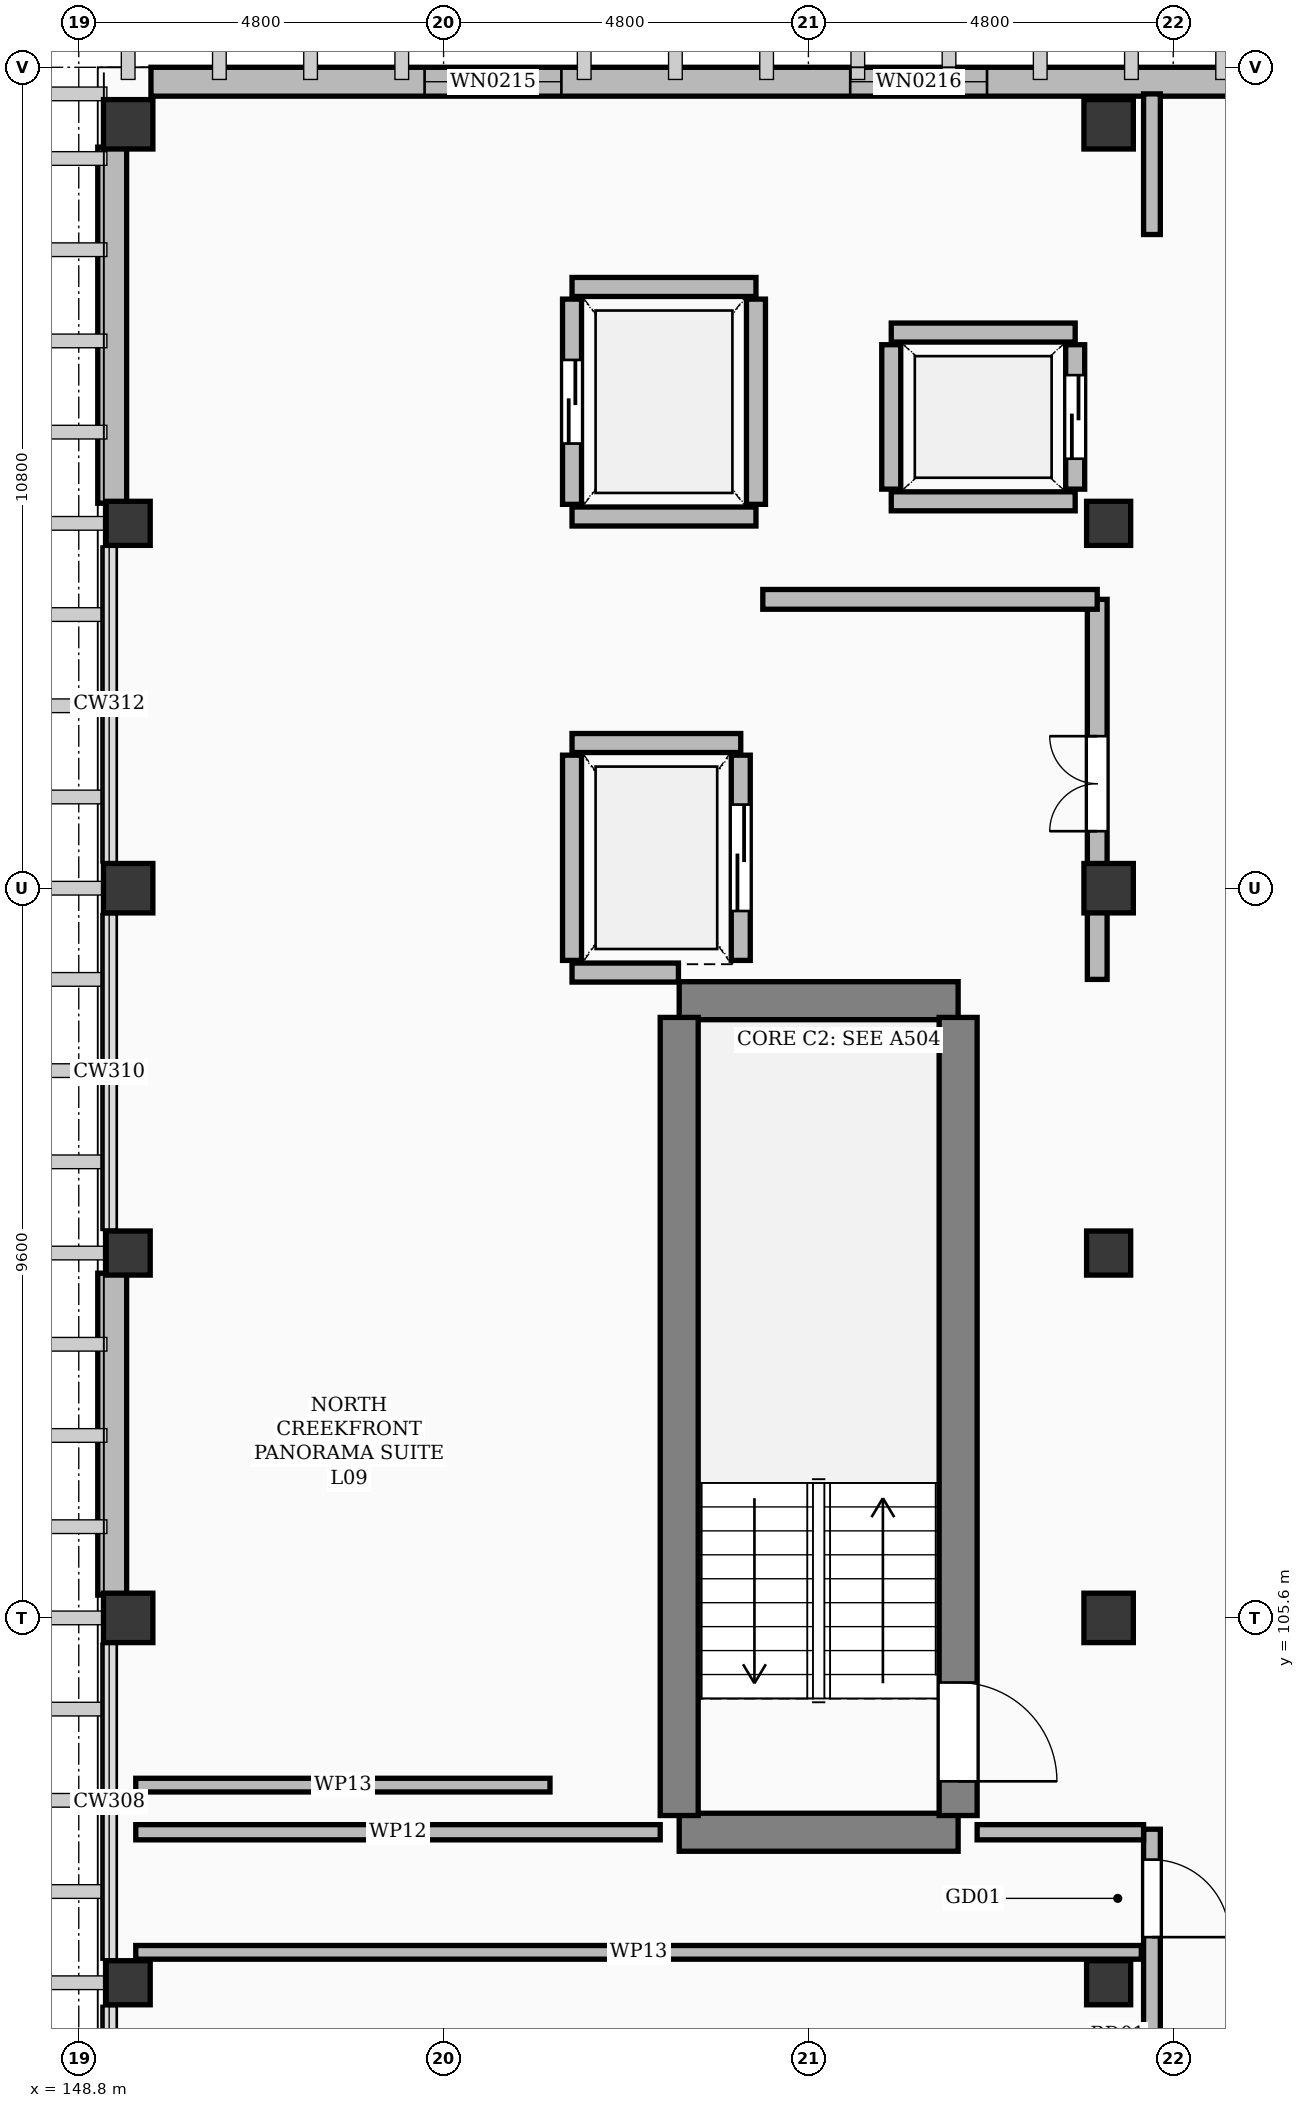
"""IFC4 building model, lengths in metres.
Left out: names, types, materials, properties, quantities, classifications, styles, units other than length and angle.
Written with IfcOpenShell. Run it as: python <this file> out.ifc"""

import sys

from ifc_helpers import new_model, si_unit, direction, frame, frame_2d, origin, origin_2d, place, context, subcontext, project, spatial, rectangle, extrude, element, fill, save


model = new_model("IFC4")
c1 = context("Model", 3, precision=1e-05, world=origin(), true_north=direction((0.0, 1.0)))
c2 = subcontext(c1, "Body", "Model", "MODEL_VIEW")
j1 = project(units=[si_unit("LENGTHUNIT", "METRE"), si_unit("PLANEANGLEUNIT", "RADIAN")], contexts=[c1])
p1 = place(None, origin())
s1 = spatial("IfcSite", under=j1, at=p1, CompositionType="ELEMENT")
p2 = place(p1, origin())
s2 = spatial("IfcBuilding", under=s1, at=p2, CompositionType="ELEMENT")
p3 = place(p2, frame((0.0, 0.0, 39.0)))
s3 = spatial("IfcBuildingStorey", under=s2, at=p3, CompositionType="ELEMENT", Elevation=39.0)
for number, where, z_axis, x_axis in (
    (1, (149.45, 105.6, 0.0), (0.0, 0.0, 1.0), (1.0, 0.0, 0.0)),
    (2, (149.45, 115.2, 0.0), (0.0, 0.0, 1.0), (1.0, 0.0, 0.0)),
    (3, (149.45, 125.25, 0.0), (0.0, 0.0, 1.0), (1.0, 0.0, 0.0)),
    (4, (162.35, 105.6, 0.0), (0.0, 0.0, 1.0), (1.0, 0.0, 0.0)),
    (5, (162.35, 115.2, 0.0), (0.0, 0.0, 1.0), (1.0, 0.0, 0.0)),
    (6, (162.35, 125.25, 0.0), (0.0, 0.0, 1.0), (1.0, 0.0, 0.0)),
):
    element("IfcColumn", number, at=place(p3, frame(where, z_axis=z_axis, x_axis=x_axis)), inside=s3, PredefinedType="COLUMN", context=c2, shape_type="SweptSolid", body=[
        extrude(rectangle(XDim=0.65, YDim=0.65, at=origin_2d()), origin(), (0.0, 0.0, 1.0), 3.6),
    ])
for number, where, z_axis, x_axis in (
    (7, (149.45, 100.8, 0.0), (0.0, 0.0, 1.0), (1.0, 0.0, 0.0)),
    (8, (149.45, 110.4, 0.0), (0.0, 0.0, 1.0), (1.0, 0.0, 0.0)),
    (9, (149.45, 120.0, 0.0), (0.0, 0.0, 1.0), (1.0, 0.0, 0.0)),
    (10, (162.35, 100.8, 0.0), (0.0, 0.0, 1.0), (1.0, 0.0, 0.0)),
    (11, (162.35, 110.4, 0.0), (0.0, 0.0, 1.0), (1.0, 0.0, 0.0)),
    (12, (162.35, 120.0, 0.0), (0.0, 0.0, 1.0), (1.0, 0.0, 0.0)),
):
    element("IfcColumn", number, at=place(p3, frame(where, z_axis=z_axis, x_axis=x_axis)), inside=s3, PredefinedType="COLUMN", context=c2, shape_type="SweptSolid", body=[
        extrude(rectangle(XDim=0.58, YDim=0.58, at=origin_2d()), origin(), (0.0, 0.0, 1.0), 3.6),
    ])
p4 = place(p3, frame((149.75, 125.81, 0.0), z_axis=(0.0, 0.0, 1.0), x_axis=(1.0, 0.0, 0.0)))
e13 = element("IfcWall", 13, at=p4, inside=s3, PredefinedType="SOLIDWALL", context=c2, shape_type="SweptSolid", body=[
    extrude(rectangle(XDim=29.3, YDim=0.38, at=frame_2d((14.65, 0.0))), origin(), (0.0, 0.0, 1.0), 3.36),
])
p5 = place(p4, frame((3.6, 0.0, 0.55)))
e14 = element("IfcOpeningElement", 14, at=p5, cuts=e13, PredefinedType="OPENING", context=c2, shape_type="SweptSolid", body=[
    extrude(rectangle(XDim=1.8, YDim=1.76, at=frame_2d((0.9, 0.88))), frame((0.0, 0.202, 0.0), z_axis=(0.0, -1.0, 0.0), x_axis=(1.0, 0.0, 0.0)), (0.0, 0.0, 1.0), 0.404),
])
p6 = place(p4, frame((9.2, 0.0, 0.55)))
e15 = element("IfcOpeningElement", 15, at=p6, cuts=e13, PredefinedType="OPENING", context=c2, shape_type="SweptSolid", body=[
    extrude(rectangle(XDim=1.8, YDim=1.76, at=frame_2d((0.9, 0.88))), frame((0.0, 0.202, 0.0), z_axis=(0.0, -1.0, 0.0), x_axis=(1.0, 0.0, 0.0)), (0.0, 0.0, 1.0), 0.404),
])
p7 = place(p4, frame((19.6, 0.0, 0.55)))
e16 = element("IfcOpeningElement", 16, at=p7, cuts=e13, PredefinedType="OPENING", context=c2, shape_type="SweptSolid", body=[
    extrude(rectangle(XDim=1.8, YDim=1.76, at=frame_2d((0.9, 0.88))), frame((0.0, 0.202, 0.0), z_axis=(0.0, -1.0, 0.0), x_axis=(1.0, 0.0, 0.0)), (0.0, 0.0, 1.0), 0.404),
])
p8 = place(p4, frame((25.2, 0.0, 0.55)))
e17 = element("IfcOpeningElement", 17, at=p8, cuts=e13, PredefinedType="OPENING", context=c2, shape_type="SweptSolid", body=[
    extrude(rectangle(XDim=1.8, YDim=1.76, at=frame_2d((0.9, 0.88))), frame((0.0, 0.202, 0.0), z_axis=(0.0, -1.0, 0.0), x_axis=(1.0, 0.0, 0.0)), (0.0, 0.0, 1.0), 0.404),
])
p9 = place(p3, frame((149.24, 105.9, 0.0), z_axis=(0.0, 0.0, 1.0), x_axis=(0.0, 1.0, 0.0)))
e18 = element("IfcWall", 18, at=p9, inside=s3, PredefinedType="SOLIDWALL", context=c2, shape_type="SweptSolid", body=[
    extrude(rectangle(XDim=4.235, YDim=0.38, at=frame_2d((2.118, 0.0))), origin(), (0.0, 0.0, 1.0), 2.772),
])
p10 = place(p3, frame((149.24, 120.265, 0.0), z_axis=(0.0, 0.0, 1.0), x_axis=(0.0, 1.0, 0.0)))
e19 = element("IfcWall", 19, at=p10, inside=s3, PredefinedType="SOLIDWALL", context=c2, shape_type="SweptSolid", body=[
    extrude(rectangle(XDim=4.685, YDim=0.38, at=frame_2d((2.343, 0.0))), origin(), (0.0, 0.0, 1.0), 2.602),
])
for number, where, z_axis, x_axis in (
    (20, (156.7, 102.78, 0.0), (0.0, 0.0, 1.0), (1.0, 0.0, 0.0)),
    (21, (156.7, 113.72, 0.0), (0.0, 0.0, 1.0), (1.0, 0.0, 0.0)),
):
    element("IfcWall", number, at=place(p3, frame(where, z_axis=z_axis, x_axis=x_axis)), inside=s3, PredefinedType="SHEAR", context=c2, shape_type="SweptSolid", body=[
        extrude(rectangle(XDim=3.67, YDim=0.5, at=frame_2d((1.835, 0.0))), origin(), (0.0, 0.0, 1.0), 3.36),
    ])
p11 = place(p3, frame((156.7, 103.0, 0.0), z_axis=(0.0, 0.0, 1.0), x_axis=(0.0, 1.0, 0.0)))
e22 = element("IfcWall", 22, at=p11, inside=s3, PredefinedType="SHEAR", context=c2, shape_type="SweptSolid", body=[
    extrude(rectangle(XDim=10.5, YDim=0.5, at=frame_2d((5.25, 0.0))), origin(), (0.0, 0.0, 1.0), 3.36),
])
p12 = place(p3, frame((160.37, 103.0, 0.0), z_axis=(0.0, 0.0, 1.0), x_axis=(0.0, 1.0, 0.0)))
e23 = element("IfcWall", 23, at=p12, inside=s3, PredefinedType="SHEAR", context=c2, shape_type="SweptSolid", body=[
    extrude(rectangle(XDim=10.5, YDim=0.5, at=frame_2d((5.25, 0.0))), origin(), (0.0, 0.0, 1.0), 3.36),
])
p13 = place(p12, frame((0.45, 0.0, 0.0)))
e24 = element("IfcOpeningElement", 24, at=p13, cuts=e23, PredefinedType="OPENING", context=c2, shape_type="SweptSolid", body=[
    extrude(rectangle(XDim=1.3, YDim=2.15, at=frame_2d((0.65, 1.075))), frame((0.0, 0.262, 0.0), z_axis=(0.0, -1.0, 0.0), x_axis=(1.0, 0.0, 0.0)), (0.0, 0.0, 1.0), 0.524),
])
p14 = place(p3, frame((155.29, 114.09, 0.0), z_axis=(0.0, 0.0, 1.0), x_axis=(1.0, 0.0, 0.0)))
e25 = element("IfcWall", 25, at=p14, inside=s3, PredefinedType="SOLIDWALL", context=c2, shape_type="SweptSolid", body=[
    extrude(rectangle(XDim=1.4, YDim=0.25, at=frame_2d((0.7, 0.0))), origin(), (0.0, 0.0, 1.0), 3.36),
])
p15 = place(p3, frame((155.29, 117.11, 0.0), z_axis=(0.0, 0.0, 1.0), x_axis=(1.0, 0.0, 0.0)))
e26 = element("IfcWall", 26, at=p15, inside=s3, PredefinedType="SOLIDWALL", context=c2, shape_type="SweptSolid", body=[
    extrude(rectangle(XDim=2.22, YDim=0.25, at=frame_2d((1.11, 0.0))), origin(), (0.0, 0.0, 1.0), 3.36),
])
p16 = place(p3, frame((155.29, 114.25, 0.0), z_axis=(0.0, 0.0, 1.0), x_axis=(0.0, 1.0, 0.0)))
e27 = element("IfcWall", 27, at=p16, inside=s3, PredefinedType="SOLIDWALL", context=c2, shape_type="SweptSolid", body=[
    extrude(rectangle(XDim=2.7, YDim=0.25, at=frame_2d((1.35, 0.0))), origin(), (0.0, 0.0, 1.0), 2.772),
])
p17 = place(p3, frame((157.51, 114.25, 0.0), z_axis=(0.0, 0.0, 1.0), x_axis=(0.0, 1.0, 0.0)))
e28 = element("IfcWall", 28, at=p17, inside=s3, PredefinedType="SOLIDWALL", context=c2, shape_type="SweptSolid", body=[
    extrude(rectangle(XDim=2.7, YDim=0.25, at=frame_2d((1.35, 0.0))), origin(), (0.0, 0.0, 1.0), 2.772),
])
p18 = place(p17, frame((0.65, 0.0, 0.0)))
e29 = element("IfcOpeningElement", 29, at=p18, cuts=e28, PredefinedType="OPENING", context=c2, shape_type="SweptSolid", body=[
    extrude(rectangle(XDim=1.4, YDim=2.3, at=frame_2d((0.7, 1.15))), frame((0.0, 0.137, 0.0), z_axis=(0.0, -1.0, 0.0), x_axis=(1.0, 0.0, 0.0)), (0.0, 0.0, 1.0), 0.274),
])
p19 = place(p3, frame((159.49, 120.29, 0.0), z_axis=(0.0, 0.0, 1.0), x_axis=(1.0, 0.0, 0.0)))
e30 = element("IfcWall", 30, at=p19, inside=s3, PredefinedType="SOLIDWALL", context=c2, shape_type="SweptSolid", body=[
    extrude(rectangle(XDim=2.42, YDim=0.25, at=frame_2d((1.21, 0.0))), origin(), (0.0, 0.0, 1.0), 2.772),
])
p20 = place(p3, frame((159.49, 122.51, 0.0), z_axis=(0.0, 0.0, 1.0), x_axis=(1.0, 0.0, 0.0)))
e31 = element("IfcWall", 31, at=p20, inside=s3, PredefinedType="SOLIDWALL", context=c2, shape_type="SweptSolid", body=[
    extrude(rectangle(XDim=2.42, YDim=0.25, at=frame_2d((1.21, 0.0))), origin(), (0.0, 0.0, 1.0), 3.36),
])
p21 = place(p3, frame((159.49, 120.45, 0.0), z_axis=(0.0, 0.0, 1.0), x_axis=(0.0, 1.0, 0.0)))
e32 = element("IfcWall", 32, at=p21, inside=s3, PredefinedType="SOLIDWALL", context=c2, shape_type="SweptSolid", body=[
    extrude(rectangle(XDim=1.9, YDim=0.25, at=frame_2d((0.95, 0.0))), origin(), (0.0, 0.0, 1.0), 3.36),
])
p22 = place(p3, frame((161.91, 120.45, 0.0), z_axis=(0.0, 0.0, 1.0), x_axis=(0.0, 1.0, 0.0)))
e33 = element("IfcWall", 33, at=p22, inside=s3, PredefinedType="SOLIDWALL", context=c2, shape_type="SweptSolid", body=[
    extrude(rectangle(XDim=1.9, YDim=0.25, at=frame_2d((0.95, 0.0))), origin(), (0.0, 0.0, 1.0), 3.36),
])
p23 = place(p22, frame((0.4, 0.0, 0.0)))
e34 = element("IfcOpeningElement", 34, at=p23, cuts=e33, PredefinedType="OPENING", context=c2, shape_type="SweptSolid", body=[
    extrude(rectangle(XDim=1.1, YDim=2.2, at=frame_2d((0.55, 1.1))), frame((0.0, 0.137, 0.0), z_axis=(0.0, -1.0, 0.0), x_axis=(1.0, 0.0, 0.0)), (0.0, 0.0, 1.0), 0.274),
])
p24 = place(p3, frame((155.29, 120.09, 0.0), z_axis=(0.0, 0.0, 1.0), x_axis=(1.0, 0.0, 0.0)))
e35 = element("IfcWall", 35, at=p24, inside=s3, PredefinedType="SOLIDWALL", context=c2, shape_type="SweptSolid", body=[
    extrude(rectangle(XDim=2.42, YDim=0.25, at=frame_2d((1.21, 0.0))), origin(), (0.0, 0.0, 1.0), 2.772),
])
p25 = place(p3, frame((155.29, 123.11, 0.0), z_axis=(0.0, 0.0, 1.0), x_axis=(1.0, 0.0, 0.0)))
e36 = element("IfcWall", 36, at=p25, inside=s3, PredefinedType="SOLIDWALL", context=c2, shape_type="SweptSolid", body=[
    extrude(rectangle(XDim=2.42, YDim=0.25, at=frame_2d((1.21, 0.0))), origin(), (0.0, 0.0, 1.0), 3.36),
])
p26 = place(p3, frame((155.29, 120.25, 0.0), z_axis=(0.0, 0.0, 1.0), x_axis=(0.0, 1.0, 0.0)))
e37 = element("IfcWall", 37, at=p26, inside=s3, PredefinedType="SOLIDWALL", context=c2, shape_type="SweptSolid", body=[
    extrude(rectangle(XDim=2.7, YDim=0.25, at=frame_2d((1.35, 0.0))), origin(), (0.0, 0.0, 1.0), 2.772),
])
p27 = place(p26, frame((0.8, 0.0, 0.0)))
e38 = element("IfcOpeningElement", 38, at=p27, cuts=e37, PredefinedType="OPENING", context=c2, shape_type="SweptSolid", body=[
    extrude(rectangle(XDim=1.1, YDim=2.2, at=frame_2d((0.55, 1.1))), frame((0.0, 0.137, 0.0), z_axis=(0.0, -1.0, 0.0), x_axis=(1.0, 0.0, 0.0)), (0.0, 0.0, 1.0), 0.274),
])
p28 = place(p3, frame((157.71, 120.25, 0.0), z_axis=(0.0, 0.0, 1.0), x_axis=(0.0, 1.0, 0.0)))
e39 = element("IfcWall", 39, at=p28, inside=s3, PredefinedType="SOLIDWALL", context=c2, shape_type="SweptSolid", body=[
    extrude(rectangle(XDim=2.7, YDim=0.25, at=frame_2d((1.35, 0.0))), origin(), (0.0, 0.0, 1.0), 2.772),
])
p29 = place(p3, frame((162.2, 114.0, 0.0), z_axis=(0.0, 0.0, 1.0), x_axis=(0.0, 1.0, 0.0)))
e40 = element("IfcWall", 40, at=p29, inside=s3, PredefinedType="SOLIDWALL", context=c2, shape_type="SweptSolid", body=[
    extrude(rectangle(XDim=5.0, YDim=0.26, at=frame_2d((2.5, 0.0))), origin(), (0.0, 0.0, 1.0), 2.772),
])
p30 = place(p29, frame((1.95, 0.0, 0.0)))
e41 = element("IfcOpeningElement", 41, at=p30, cuts=e40, PredefinedType="OPENING", context=c2, shape_type="SweptSolid", body=[
    extrude(rectangle(XDim=1.25, YDim=2.15, at=frame_2d((0.625, 1.075))), frame((0.0, 0.142, 0.0), z_axis=(0.0, -1.0, 0.0), x_axis=(1.0, 0.0, 0.0)), (0.0, 0.0, 1.0), 0.284),
])
p31 = place(p3, frame((157.8, 119.0, 0.0), z_axis=(0.0, 0.0, 1.0), x_axis=(1.0, 0.0, 0.0)))
e42 = element("IfcWall", 42, at=p31, inside=s3, PredefinedType="SOLIDWALL", context=c2, shape_type="SweptSolid", body=[
    extrude(rectangle(XDim=4.4, YDim=0.26, at=frame_2d((2.2, 0.0))), origin(), (0.0, 0.0, 1.0), 2.772),
])
p32 = place(p3, frame((162.92, 95.6, 0.0), z_axis=(0.0, 0.0, 1.0), x_axis=(0.0, 1.0, 0.0)))
e43 = element("IfcWall", 43, at=p32, inside=s3, PredefinedType="PARTITIONING", context=c2, shape_type="SweptSolid", body=[
    extrude(rectangle(XDim=7.22, YDim=0.22, at=frame_2d((3.61, 0.0))), origin(), (0.0, 0.0, 1.0), 2.772),
])
p33 = place(p32, frame((2.05, 0.0, 0.0)))
e44 = element("IfcOpeningElement", 44, at=p33, cuts=e43, PredefinedType="OPENING", context=c2, shape_type="SweptSolid", body=[
    extrude(rectangle(XDim=1.12, YDim=2.15, at=frame_2d((0.56, 1.075))), frame((0.0, 0.122, 0.0), z_axis=(0.0, -1.0, 0.0), x_axis=(1.0, 0.0, 0.0)), (0.0, 0.0, 1.0), 0.244),
])
p34 = place(p32, frame((5.8, 0.0, 0.0)))
e45 = element("IfcOpeningElement", 45, at=p34, cuts=e43, PredefinedType="OPENING", context=c2, shape_type="SweptSolid", body=[
    extrude(rectangle(XDim=1.02, YDim=2.2, at=frame_2d((0.51, 1.1))), frame((0.0, 0.122, 0.0), z_axis=(0.0, -1.0, 0.0), x_axis=(1.0, 0.0, 0.0)), (0.0, 0.0, 1.0), 0.244),
])
p35 = place(p3, frame((162.92, 123.8, 0.0), z_axis=(0.0, 0.0, 1.0), x_axis=(0.0, 1.0, 0.0)))
e46 = element("IfcWall", 46, at=p35, inside=s3, PredefinedType="PARTITIONING", context=c2, shape_type="SweptSolid", body=[
    extrude(rectangle(XDim=1.85, YDim=0.22, at=frame_2d((0.925, 0.0))), origin(), (0.0, 0.0, 1.0), 2.602),
])
p36 = place(p3, frame((149.55, 101.2, 0.0), z_axis=(0.0, 0.0, 1.0), x_axis=(1.0, 0.0, 0.0)))
e47 = element("IfcWall", 47, at=p36, inside=s3, PredefinedType="PARTITIONING", context=c2, shape_type="SweptSolid", body=[
    extrude(rectangle(XDim=13.23, YDim=0.18, at=frame_2d((6.615, 0.0))), origin(), (0.0, 0.0, 1.0), 2.772),
])
p37 = place(p3, frame((149.55, 102.78, 0.0), z_axis=(0.0, 0.0, 1.0), x_axis=(1.0, 0.0, 0.0)))
e48 = element("IfcWall", 48, at=p37, inside=s3, PredefinedType="PARTITIONING", context=c2, shape_type="SweptSolid", body=[
    extrude(rectangle(XDim=6.9, YDim=0.2, at=frame_2d((3.45, 0.0))), origin(), (0.0, 0.0, 1.0), 2.772),
])
p38 = place(p3, frame((160.62, 102.78, 0.0), z_axis=(0.0, 0.0, 1.0), x_axis=(1.0, 0.0, 0.0)))
e49 = element("IfcWall", 49, at=p38, inside=s3, PredefinedType="PARTITIONING", context=c2, shape_type="SweptSolid", body=[
    extrude(rectangle(XDim=2.19, YDim=0.2, at=frame_2d((1.095, 0.0))), origin(), (0.0, 0.0, 1.0), 2.772),
])
p39 = place(p3, frame((149.55, 103.4, 0.0), z_axis=(0.0, 0.0, 1.0), x_axis=(1.0, 0.0, 0.0)))
e50 = element("IfcWall", 50, at=p39, inside=s3, PredefinedType="PARTITIONING", context=c2, shape_type="SweptSolid", body=[
    extrude(rectangle(XDim=5.45, YDim=0.18, at=frame_2d((2.725, 0.0))), origin(), (0.0, 0.0, 1.0), 2.772),
])
p40 = place(p5, origin())
e51 = element("IfcWindow", 51, at=p40, inside=s3, PartitioningType="SINGLE_PANEL", PredefinedType="WINDOW", context=c2, shape_type="SweptSolid", body=[
    extrude(rectangle(XDim=1.8, YDim=1.76, at=frame_2d((0.9, 0.88))), frame((0.0, 0.03, 0.0), z_axis=(0.0, -1.0, 0.0), x_axis=(1.0, 0.0, 0.0)), (0.0, 0.0, 1.0), 0.06),
])
fill(e14, e51)
p41 = place(p6, origin())
e52 = element("IfcWindow", 52, at=p41, inside=s3, PartitioningType="SINGLE_PANEL", PredefinedType="WINDOW", context=c2, shape_type="SweptSolid", body=[
    extrude(rectangle(XDim=1.8, YDim=1.76, at=frame_2d((0.9, 0.88))), frame((0.0, 0.03, 0.0), z_axis=(0.0, -1.0, 0.0), x_axis=(1.0, 0.0, 0.0)), (0.0, 0.0, 1.0), 0.06),
])
fill(e15, e52)
p42 = place(p13, frame((1.3, 0.0, 0.0), z_axis=(0.0, 0.0, 1.0), x_axis=(-1.0, 0.0, 0.0)))
e53 = element("IfcDoor", 53, at=p42, inside=s3, OperationType="SINGLE_SWING_LEFT", PredefinedType="DOOR", context=c2, shape_type="SweptSolid", body=[
    extrude(rectangle(XDim=1.3, YDim=2.15, at=frame_2d((0.65, 1.075))), frame((0.0, 0.025, 0.0), z_axis=(0.0, -1.0, 0.0), x_axis=(1.0, 0.0, 0.0)), (0.0, 0.0, 1.0), 0.05),
])
fill(e24, e53)
p43 = place(p18, origin())
e54 = element("IfcDoor", 54, at=p43, inside=s3, OperationType="SLIDING_TO_LEFT", PredefinedType="DOOR", context=c2, shape_type="SweptSolid", body=[
    extrude(rectangle(XDim=1.4, YDim=2.3, at=frame_2d((0.7, 1.15))), frame((0.0, 0.025, 0.0), z_axis=(0.0, -1.0, 0.0), x_axis=(1.0, 0.0, 0.0)), (0.0, 0.0, 1.0), 0.05),
])
fill(e29, e54)
p44 = place(p23, origin())
e55 = element("IfcDoor", 55, at=p44, inside=s3, OperationType="SLIDING_TO_LEFT", PredefinedType="DOOR", context=c2, shape_type="SweptSolid", body=[
    extrude(rectangle(XDim=1.1, YDim=2.2, at=frame_2d((0.55, 1.1))), frame((0.0, 0.025, 0.0), z_axis=(0.0, -1.0, 0.0), x_axis=(1.0, 0.0, 0.0)), (0.0, 0.0, 1.0), 0.05),
])
fill(e34, e55)
p45 = place(p27, origin())
e56 = element("IfcDoor", 56, at=p45, inside=s3, OperationType="SLIDING_TO_LEFT", PredefinedType="DOOR", context=c2, shape_type="SweptSolid", body=[
    extrude(rectangle(XDim=1.1, YDim=2.2, at=frame_2d((0.55, 1.1))), frame((0.0, 0.025, 0.0), z_axis=(0.0, -1.0, 0.0), x_axis=(1.0, 0.0, 0.0)), (0.0, 0.0, 1.0), 0.05),
])
fill(e38, e56)
p46 = place(p30, origin())
e57 = element("IfcDoor", 57, at=p46, inside=s3, OperationType="DOUBLE_DOOR_SINGLE_SWING", PredefinedType="DOOR", context=c2, shape_type="SweptSolid", body=[
    extrude(rectangle(XDim=1.25, YDim=2.15, at=frame_2d((0.625, 1.075))), frame((0.0, 0.025, 0.0), z_axis=(0.0, -1.0, 0.0), x_axis=(1.0, 0.0, 0.0)), (0.0, 0.0, 1.0), 0.05),
])
fill(e41, e57)
p47 = place(p34, frame((1.02, 0.0, 0.0), z_axis=(0.0, 0.0, 1.0), x_axis=(-1.0, 0.0, 0.0)))
e58 = element("IfcDoor", 58, at=p47, inside=s3, OperationType="SINGLE_SWING_LEFT", PredefinedType="DOOR", context=c2, shape_type="SweptSolid", body=[
    extrude(rectangle(XDim=1.02, YDim=2.2, at=frame_2d((0.51, 1.1))), frame((0.0, 0.025, 0.0), z_axis=(0.0, -1.0, 0.0), x_axis=(1.0, 0.0, 0.0)), (0.0, 0.0, 1.0), 0.05),
])
fill(e45, e58)
save(model, sys.argv[1])
